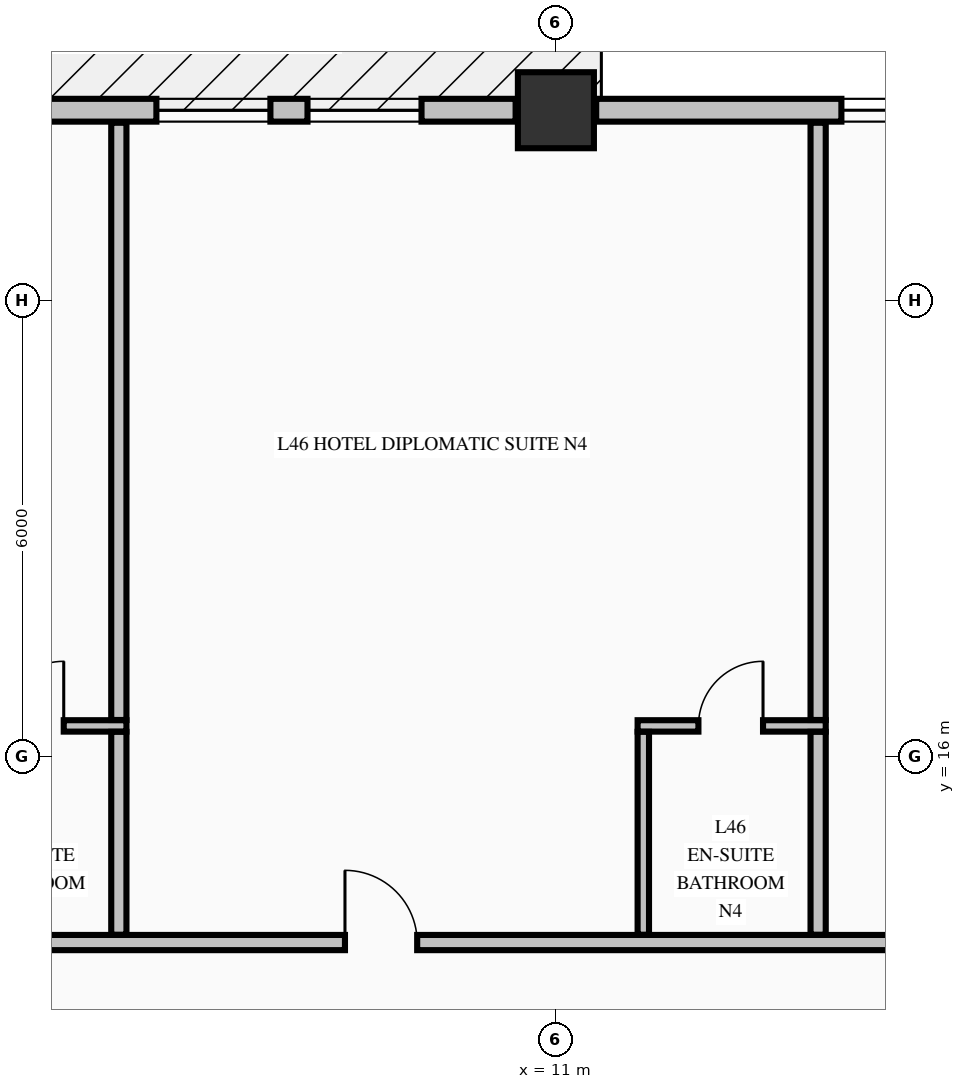
"""IFC4 building model, lengths in metres.
Left out: names, types, materials, properties, quantities, classifications, styles, units other than length and angle.
Written with IfcOpenShell. Run it as: python <this file> out.ifc"""

import sys

from ifc_helpers import new_model, si_unit, direction, frame, frame_2d, origin, origin_2d, place, context, subcontext, project, spatial, rectangle, extrude, element, fill, save


model = new_model("IFC4")
c1 = context("Model", 3, precision=1e-05, world=origin(), true_north=direction((0.0, 1.0)))
c2 = subcontext(c1, "Body", "Model", "MODEL_VIEW")
j1 = project(units=[si_unit("LENGTHUNIT", "METRE"), si_unit("PLANEANGLEUNIT", "RADIAN")], contexts=[c1])
p1 = place(None, origin())
s1 = spatial("IfcSite", under=j1, at=p1, CompositionType="ELEMENT")
p2 = place(p1, origin())
s2 = spatial("IfcBuilding", under=s1, at=p2, CompositionType="ELEMENT")
p3 = place(p2, frame((0.0, 0.0, 179.66)))
s3 = spatial("IfcBuildingStorey", under=s2, at=p3, CompositionType="ELEMENT", Elevation=179.66)
p4 = place(p3, frame((11.0, 24.5, -0.25), z_axis=(0.0, 0.0, 1.0), x_axis=(1.0, 0.0, 0.0)))
e1 = element("IfcColumn", 1, at=p4, inside=s3, PredefinedType="COLUMN", context=c2, shape_type="SweptSolid", body=[
    extrude(rectangle(XDim=1.0, YDim=1.0, at=origin_2d()), origin(), (0.0, 0.0, 1.0), 3.4),
])
p5 = place(p3, frame((10.47, 24.5, 0.0), z_axis=(0.0, 0.0, 1.0), x_axis=(-1.0, 0.0, 0.0)))
e2 = element("IfcWall", 2, at=p5, inside=s3, PredefinedType="STANDARD", context=c2, shape_type="SweptSolid", body=[
    extrude(rectangle(XDim=9.94, YDim=0.3, at=frame_2d((4.97, 0.0))), origin(), (0.0, 0.0, 1.0), 2.542),
])
p6 = place(p5, frame((1.238, 0.0, 0.72)))
e3 = element("IfcOpeningElement", 3, at=p6, cuts=e2, PredefinedType="OPENING", context=c2, shape_type="SweptSolid", body=[
    extrude(rectangle(XDim=1.5, YDim=1.6, at=frame_2d((0.75, 0.8))), frame((0.0, 0.16, 0.0), z_axis=(0.0, -1.0, 0.0), x_axis=(1.0, 0.0, 0.0)), (0.0, 0.0, 1.0), 0.32),
])
p7 = place(p5, frame((3.226, 0.0, 0.72)))
e4 = element("IfcOpeningElement", 4, at=p7, cuts=e2, PredefinedType="OPENING", context=c2, shape_type="SweptSolid", body=[
    extrude(rectangle(XDim=1.5, YDim=1.6, at=frame_2d((0.75, 0.8))), frame((0.0, 0.16, 0.0), z_axis=(0.0, -1.0, 0.0), x_axis=(1.0, 0.0, 0.0)), (0.0, 0.0, 1.0), 0.32),
])
p8 = place(p5, frame((7.202, 0.0, 0.72)))
e5 = element("IfcOpeningElement", 5, at=p8, cuts=e2, PredefinedType="OPENING", context=c2, shape_type="SweptSolid", body=[
    extrude(rectangle(XDim=1.5, YDim=1.6, at=frame_2d((0.75, 0.8))), frame((0.0, 0.16, 0.0), z_axis=(0.0, -1.0, 0.0), x_axis=(1.0, 0.0, 0.0)), (0.0, 0.0, 1.0), 0.32),
])
p9 = place(p3, frame((21.47, 24.5, 0.0), z_axis=(0.0, 0.0, 1.0), x_axis=(-1.0, 0.0, 0.0)))
e6 = element("IfcWall", 6, at=p9, inside=s3, PredefinedType="STANDARD", context=c2, shape_type="SweptSolid", body=[
    extrude(rectangle(XDim=9.94, YDim=0.3, at=frame_2d((4.97, 0.0))), origin(), (0.0, 0.0, 1.0), 2.542),
])
p10 = place(p9, frame((3.226, 0.0, 0.72)))
e7 = element("IfcOpeningElement", 7, at=p10, cuts=e6, PredefinedType="OPENING", context=c2, shape_type="SweptSolid", body=[
    extrude(rectangle(XDim=1.5, YDim=1.6, at=frame_2d((0.75, 0.8))), frame((0.0, 0.16, 0.0), z_axis=(0.0, -1.0, 0.0), x_axis=(1.0, 0.0, 0.0)), (0.0, 0.0, 1.0), 0.32),
])
p11 = place(p9, frame((5.214, 0.0, 0.72)))
e8 = element("IfcOpeningElement", 8, at=p11, cuts=e6, PredefinedType="OPENING", context=c2, shape_type="SweptSolid", body=[
    extrude(rectangle(XDim=1.5, YDim=1.6, at=frame_2d((0.75, 0.8))), frame((0.0, 0.16, 0.0), z_axis=(0.0, -1.0, 0.0), x_axis=(1.0, 0.0, 0.0)), (0.0, 0.0, 1.0), 0.32),
])
p12 = place(p3, frame((-17.1, 13.55, 0.0), z_axis=(0.0, 0.0, 1.0), x_axis=(1.0, 0.0, 0.0)))
e9 = element("IfcWall", 9, at=p12, inside=s3, PredefinedType="PARTITIONING", context=c2, shape_type="SweptSolid", body=[
    extrude(rectangle(XDim=39.2, YDim=0.2, at=frame_2d((19.6, 0.0))), origin(), (0.0, 0.0, 1.0), 3.15),
])
p13 = place(p12, frame((3.695, 0.0, 0.0)))
e10 = element("IfcOpeningElement", 10, at=p13, cuts=e9, PredefinedType="OPENING", context=c2, shape_type="SweptSolid", body=[
    extrude(rectangle(XDim=0.95, YDim=2.15, at=frame_2d((0.475, 1.075))), frame((0.0, 0.11, 0.0), z_axis=(0.0, -1.0, 0.0), x_axis=(1.0, 0.0, 0.0)), (0.0, 0.0, 1.0), 0.22),
])
p14 = place(p12, frame((11.695, 0.0, 0.0)))
e11 = element("IfcOpeningElement", 11, at=p14, cuts=e9, PredefinedType="OPENING", context=c2, shape_type="SweptSolid", body=[
    extrude(rectangle(XDim=0.95, YDim=2.15, at=frame_2d((0.475, 1.075))), frame((0.0, 0.11, 0.0), z_axis=(0.0, -1.0, 0.0), x_axis=(1.0, 0.0, 0.0)), (0.0, 0.0, 1.0), 0.22),
])
p15 = place(p12, frame((17.125, 0.0, 0.0)))
e12 = element("IfcOpeningElement", 12, at=p15, cuts=e9, PredefinedType="OPENING", context=c2, shape_type="SweptSolid", body=[
    extrude(rectangle(XDim=0.95, YDim=2.15, at=frame_2d((0.475, 1.075))), frame((0.0, 0.11, 0.0), z_axis=(0.0, -1.0, 0.0), x_axis=(1.0, 0.0, 0.0)), (0.0, 0.0, 1.0), 0.22),
])
p16 = place(p12, frame((25.325, 0.0, 0.0)))
e13 = element("IfcOpeningElement", 13, at=p16, cuts=e9, PredefinedType="OPENING", context=c2, shape_type="SweptSolid", body=[
    extrude(rectangle(XDim=0.95, YDim=2.15, at=frame_2d((0.475, 1.075))), frame((0.0, 0.11, 0.0), z_axis=(0.0, -1.0, 0.0), x_axis=(1.0, 0.0, 0.0)), (0.0, 0.0, 1.0), 0.22),
])
p17 = place(p12, frame((33.695, 0.0, 0.0)))
e14 = element("IfcOpeningElement", 14, at=p17, cuts=e9, PredefinedType="OPENING", context=c2, shape_type="SweptSolid", body=[
    extrude(rectangle(XDim=0.95, YDim=2.15, at=frame_2d((0.475, 1.075))), frame((0.0, 0.11, 0.0), z_axis=(0.0, -1.0, 0.0), x_axis=(1.0, 0.0, 0.0)), (0.0, 0.0, 1.0), 0.22),
])
p18 = place(p3, frame((2.875, 16.4, 0.0), z_axis=(0.0, 0.0, 1.0), x_axis=(1.0, 0.0, 0.0)))
e15 = element("IfcWall", 15, at=p18, inside=s3, PredefinedType="PARTITIONING", context=c2, shape_type="SweptSolid", body=[
    extrude(rectangle(XDim=2.475, YDim=0.15, at=frame_2d((1.238, 0.0))), origin(), (0.0, 0.0, 1.0), 3.15),
])
p19 = place(p18, frame((0.8, 0.0, 0.0)))
e16 = element("IfcOpeningElement", 16, at=p19, cuts=e15, PredefinedType="OPENING", context=c2, shape_type="SweptSolid", body=[
    extrude(rectangle(XDim=0.85, YDim=2.1, at=frame_2d((0.425, 1.05))), frame((0.0, 0.085, 0.0), z_axis=(0.0, -1.0, 0.0), x_axis=(1.0, 0.0, 0.0)), (0.0, 0.0, 1.0), 0.17),
])
p20 = place(p3, frame((12.075, 16.4, 0.0), z_axis=(0.0, 0.0, 1.0), x_axis=(1.0, 0.0, 0.0)))
e17 = element("IfcWall", 17, at=p20, inside=s3, PredefinedType="PARTITIONING", context=c2, shape_type="SweptSolid", body=[
    extrude(rectangle(XDim=2.475, YDim=0.15, at=frame_2d((1.238, 0.0))), origin(), (0.0, 0.0, 1.0), 3.15),
])
p21 = place(p20, frame((0.8, 0.0, 0.0)))
e18 = element("IfcOpeningElement", 18, at=p21, cuts=e17, PredefinedType="OPENING", context=c2, shape_type="SweptSolid", body=[
    extrude(rectangle(XDim=0.85, YDim=2.1, at=frame_2d((0.425, 1.05))), frame((0.0, 0.085, 0.0), z_axis=(0.0, -1.0, 0.0), x_axis=(1.0, 0.0, 0.0)), (0.0, 0.0, 1.0), 0.17),
])
p22 = place(p3, frame((5.25, 13.653, 0.0), z_axis=(0.0, 0.0, 1.0), x_axis=(0.0, 1.0, 0.0)))
e19 = element("IfcWall", 19, at=p22, inside=s3, PredefinedType="PARTITIONING", context=c2, shape_type="SweptSolid", body=[
    extrude(rectangle(XDim=2.669, YDim=0.2, at=frame_2d((1.334, 0.0))), origin(), (0.0, 0.0, 1.0), 3.15),
])
p23 = place(p3, frame((5.25, 16.478, 0.0), z_axis=(0.0, 0.0, 1.0), x_axis=(0.0, 1.0, 0.0)))
e20 = element("IfcWall", 20, at=p23, inside=s3, PredefinedType="PARTITIONING", context=c2, shape_type="SweptSolid", body=[
    extrude(rectangle(XDim=7.857, YDim=0.2, at=frame_2d((3.928, 0.0))), origin(), (0.0, 0.0, 1.0), 3.15),
])
p24 = place(p3, frame((12.15, 13.653, 0.0), z_axis=(0.0, 0.0, 1.0), x_axis=(0.0, 1.0, 0.0)))
e21 = element("IfcWall", 21, at=p24, inside=s3, PredefinedType="PARTITIONING", context=c2, shape_type="SweptSolid", body=[
    extrude(rectangle(XDim=2.669, YDim=0.15, at=frame_2d((1.334, 0.0))), origin(), (0.0, 0.0, 1.0), 3.15),
])
p25 = place(p3, frame((14.45, 13.653, 0.0), z_axis=(0.0, 0.0, 1.0), x_axis=(0.0, 1.0, 0.0)))
e22 = element("IfcWall", 22, at=p25, inside=s3, PredefinedType="PARTITIONING", context=c2, shape_type="SweptSolid", body=[
    extrude(rectangle(XDim=2.669, YDim=0.2, at=frame_2d((1.334, 0.0))), origin(), (0.0, 0.0, 1.0), 3.15),
])
p26 = place(p3, frame((14.45, 16.478, 0.0), z_axis=(0.0, 0.0, 1.0), x_axis=(0.0, 1.0, 0.0)))
e23 = element("IfcWall", 23, at=p26, inside=s3, PredefinedType="PARTITIONING", context=c2, shape_type="SweptSolid", body=[
    extrude(rectangle(XDim=7.857, YDim=0.2, at=frame_2d((3.928, 0.0))), origin(), (0.0, 0.0, 1.0), 3.15),
])
p27 = place(p6, origin())
e24 = element("IfcWindow", 24, at=p27, inside=s3, PartitioningType="SINGLE_PANEL", PredefinedType="WINDOW", context=c2, shape_type="SweptSolid", body=[
    extrude(rectangle(XDim=1.5, YDim=1.6, at=frame_2d((0.75, 0.8))), frame((0.0, 0.03, 0.0), z_axis=(0.0, -1.0, 0.0), x_axis=(1.0, 0.0, 0.0)), (0.0, 0.0, 1.0), 0.06),
])
fill(e3, e24)
p28 = place(p7, origin())
e25 = element("IfcWindow", 25, at=p28, inside=s3, PartitioningType="SINGLE_PANEL", PredefinedType="WINDOW", context=c2, shape_type="SweptSolid", body=[
    extrude(rectangle(XDim=1.5, YDim=1.6, at=frame_2d((0.75, 0.8))), frame((0.0, 0.03, 0.0), z_axis=(0.0, -1.0, 0.0), x_axis=(1.0, 0.0, 0.0)), (0.0, 0.0, 1.0), 0.06),
])
fill(e4, e25)
p29 = place(p11, origin())
e26 = element("IfcWindow", 26, at=p29, inside=s3, PartitioningType="SINGLE_PANEL", PredefinedType="WINDOW", context=c2, shape_type="SweptSolid", body=[
    extrude(rectangle(XDim=1.5, YDim=1.6, at=frame_2d((0.75, 0.8))), frame((0.0, 0.03, 0.0), z_axis=(0.0, -1.0, 0.0), x_axis=(1.0, 0.0, 0.0)), (0.0, 0.0, 1.0), 0.06),
])
fill(e8, e26)
p30 = place(p19, origin())
e27 = element("IfcDoor", 27, at=p30, inside=s3, OperationType="SINGLE_SWING_RIGHT", PredefinedType="DOOR", context=c2, shape_type="SweptSolid", body=[
    extrude(rectangle(XDim=0.85, YDim=2.1, at=frame_2d((0.425, 1.05))), frame((0.0, 0.025, 0.0), z_axis=(0.0, -1.0, 0.0), x_axis=(1.0, 0.0, 0.0)), (0.0, 0.0, 1.0), 0.05),
])
fill(e16, e27)
p31 = place(p16, origin())
e28 = element("IfcDoor", 28, at=p31, inside=s3, OperationType="SINGLE_SWING_LEFT", PredefinedType="DOOR", context=c2, shape_type="SweptSolid", body=[
    extrude(rectangle(XDim=0.95, YDim=2.15, at=frame_2d((0.475, 1.075))), frame((0.0, 0.025, 0.0), z_axis=(0.0, -1.0, 0.0), x_axis=(1.0, 0.0, 0.0)), (0.0, 0.0, 1.0), 0.05),
])
fill(e13, e28)
p32 = place(p21, origin())
e29 = element("IfcDoor", 29, at=p32, inside=s3, OperationType="SINGLE_SWING_RIGHT", PredefinedType="DOOR", context=c2, shape_type="SweptSolid", body=[
    extrude(rectangle(XDim=0.85, YDim=2.1, at=frame_2d((0.425, 1.05))), frame((0.0, 0.025, 0.0), z_axis=(0.0, -1.0, 0.0), x_axis=(1.0, 0.0, 0.0)), (0.0, 0.0, 1.0), 0.05),
])
fill(e18, e29)
save(model, sys.argv[1])
